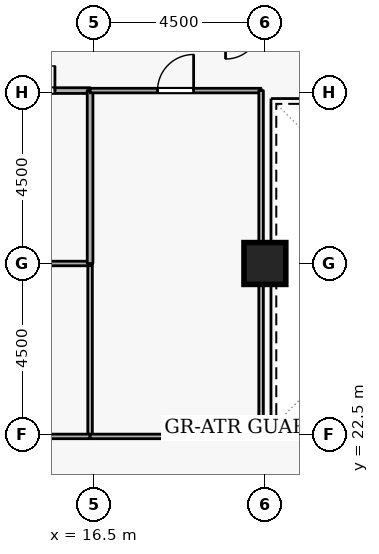
"""IFC4 building model, lengths in metres.
Left out: names, types, materials, properties, quantities, classifications, styles, units other than length and angle.
Written with IfcOpenShell. Run it as: python <this file> out.ifc"""

import sys

from ifc_helpers import new_model, si_unit, direction, frame, frame_2d, origin, origin_2d, place, context, subcontext, project, spatial, rectangle, extrude, element, fill, save


model = new_model("IFC4")
c1 = context("Model", 3, precision=1e-05, world=origin(), true_north=direction((0.0, 1.0)))
c2 = subcontext(c1, "Body", "Model", "MODEL_VIEW")
j1 = project(units=[si_unit("LENGTHUNIT", "METRE"), si_unit("PLANEANGLEUNIT", "RADIAN")], contexts=[c1])
p1 = place(None, origin())
s1 = spatial("IfcSite", under=j1, at=p1, CompositionType="ELEMENT")
p2 = place(p1, origin())
s2 = spatial("IfcBuilding", under=s1, at=p2, CompositionType="ELEMENT")
p3 = place(p2, frame((0.0, 0.0, 163.5)))
s3 = spatial("IfcBuildingStorey", under=s2, at=p3, CompositionType="ELEMENT", Elevation=163.5)
p4 = place(p3, frame((21.0, 27.0, 0.0), z_axis=(0.0, 0.0, 1.0), x_axis=(1.0, 0.0, 0.0)))
e1 = element("IfcColumn", 1, at=p4, inside=s3, PredefinedType="COLUMN", context=c2, shape_type="SweptSolid", body=[
    extrude(rectangle(XDim=1.1, YDim=1.1, at=origin_2d()), origin(), (0.0, 0.0, 1.0), 3.6),
])
p5 = place(p3, frame((16.4, 27.0, 0.0), z_axis=(0.0, 0.0, 1.0), x_axis=(0.0, -1.0, 0.0)))
e2 = element("IfcWall", 2, at=p5, inside=s3, PredefinedType="PARTITIONING", context=c2, shape_type="SweptSolid", body=[
    extrude(rectangle(XDim=4.55, YDim=0.12, at=frame_2d((2.275, 0.0))), origin(), (0.0, 0.0, 1.0), 3.34),
])
p6 = place(p3, frame((16.4, 22.45, 0.0), z_axis=(0.0, 0.0, 1.0), x_axis=(-1.0, 0.0, 0.0)))
e3 = element("IfcWall", 3, at=p6, inside=s3, PredefinedType="PARTITIONING", context=c2, shape_type="SweptSolid", body=[
    extrude(rectangle(XDim=1.2, YDim=0.12, at=frame_2d((0.6, 0.0))), origin(), (0.0, 0.0, 1.0), 3.34),
])
p7 = place(p3, frame((7.78, 27.0, 0.0), z_axis=(0.0, 0.0, 1.0), x_axis=(1.0, 0.0, 0.0)))
e4 = element("IfcWall", 4, at=p7, inside=s3, PredefinedType="PARTITIONING", context=c2, shape_type="SweptSolid", body=[
    extrude(rectangle(XDim=8.62, YDim=0.12, at=frame_2d((4.31, 0.0))), origin(), (0.0, 0.0, 1.0), 2.878),
])
p8 = place(p3, frame((13.25, 31.55, 0.0), z_axis=(0.0, 0.0, 1.0), x_axis=(1.0, 0.0, 0.0)))
e5 = element("IfcWall", 5, at=p8, inside=s3, PredefinedType="PARTITIONING", context=c2, shape_type="SweptSolid", body=[
    extrude(rectangle(XDim=3.15, YDim=0.15, at=frame_2d((1.575, 0.0))), origin(), (0.0, 0.0, 1.0), 3.34),
])
p9 = place(p8, frame((0.925, 0.0, 0.0)))
e6 = element("IfcOpeningElement", 6, at=p9, cuts=e5, PredefinedType="OPENING", context=c2, shape_type="SweptSolid", body=[
    extrude(rectangle(XDim=1.3, YDim=2.12, at=frame_2d((0.65, 1.06))), frame((0.0, 0.085, 0.0), z_axis=(0.0, -1.0, 0.0), x_axis=(1.0, 0.0, 0.0)), (0.0, 0.0, 1.0), 0.17),
])
p10 = place(p3, frame((16.4, 31.55, 0.0), z_axis=(0.0, 0.0, 1.0), x_axis=(0.0, -1.0, 0.0)))
e7 = element("IfcWall", 7, at=p10, inside=s3, PredefinedType="PARTITIONING", context=c2, shape_type="SweptSolid", body=[
    extrude(rectangle(XDim=4.55, YDim=0.15, at=frame_2d((2.275, 0.0))), origin(), (0.0, 0.0, 1.0), 3.34),
])
p11 = place(p3, frame((16.4, 31.55, 0.0), z_axis=(0.0, 0.0, 1.0), x_axis=(1.0, 0.0, 0.0)))
e8 = element("IfcWall", 8, at=p11, inside=s3, PredefinedType="PARTITIONING", context=c2, shape_type="SweptSolid", body=[
    extrude(rectangle(XDim=4.5, YDim=0.12, at=frame_2d((2.25, 0.0))), origin(), (0.0, 0.0, 1.0), 3.34),
])
p12 = place(p11, frame((1.775, 0.0, 0.0)))
e9 = element("IfcOpeningElement", 9, at=p12, cuts=e8, PredefinedType="OPENING", context=c2, shape_type="SweptSolid", body=[
    extrude(rectangle(XDim=0.95, YDim=2.1, at=frame_2d((0.475, 1.05))), frame((0.0, 0.07, 0.0), z_axis=(0.0, -1.0, 0.0), x_axis=(1.0, 0.0, 0.0)), (0.0, 0.0, 1.0), 0.14),
])
p13 = place(p3, frame((20.9, 31.55, 0.0), z_axis=(0.0, 0.0, 1.0), x_axis=(0.0, -1.0, 0.0)))
e10 = element("IfcWall", 10, at=p13, inside=s3, PredefinedType="PARTITIONING", context=c2, shape_type="SweptSolid", body=[
    extrude(rectangle(XDim=9.1, YDim=0.12, at=frame_2d((4.55, 0.0))), origin(), (0.0, 0.0, 1.0), 3.34),
])
p14 = place(p3, frame((20.9, 22.45, 0.0), z_axis=(0.0, 0.0, 1.0), x_axis=(-1.0, 0.0, 0.0)))
e11 = element("IfcWall", 11, at=p14, inside=s3, PredefinedType="PARTITIONING", context=c2, shape_type="SweptSolid", body=[
    extrude(rectangle(XDim=4.5, YDim=0.12, at=frame_2d((2.25, 0.0))), origin(), (0.0, 0.0, 1.0), 3.34),
])
p15 = place(p9, origin())
e12 = element("IfcDoor", 12, at=p15, inside=s3, OperationType="DOUBLE_DOOR_SINGLE_SWING", PredefinedType="DOOR", context=c2, shape_type="SweptSolid", body=[
    extrude(rectangle(XDim=1.3, YDim=2.12, at=frame_2d((0.65, 1.06))), frame((0.0, 0.025, 0.0), z_axis=(0.0, -1.0, 0.0), x_axis=(1.0, 0.0, 0.0)), (0.0, 0.0, 1.0), 0.05),
])
fill(e6, e12)
p16 = place(p12, origin())
e13 = element("IfcDoor", 13, at=p16, inside=s3, OperationType="SINGLE_SWING_RIGHT", PredefinedType="DOOR", context=c2, shape_type="SweptSolid", body=[
    extrude(rectangle(XDim=0.95, YDim=2.1, at=frame_2d((0.475, 1.05))), frame((0.0, 0.025, 0.0), z_axis=(0.0, -1.0, 0.0), x_axis=(1.0, 0.0, 0.0)), (0.0, 0.0, 1.0), 0.05),
])
fill(e9, e13)
save(model, sys.argv[1])
